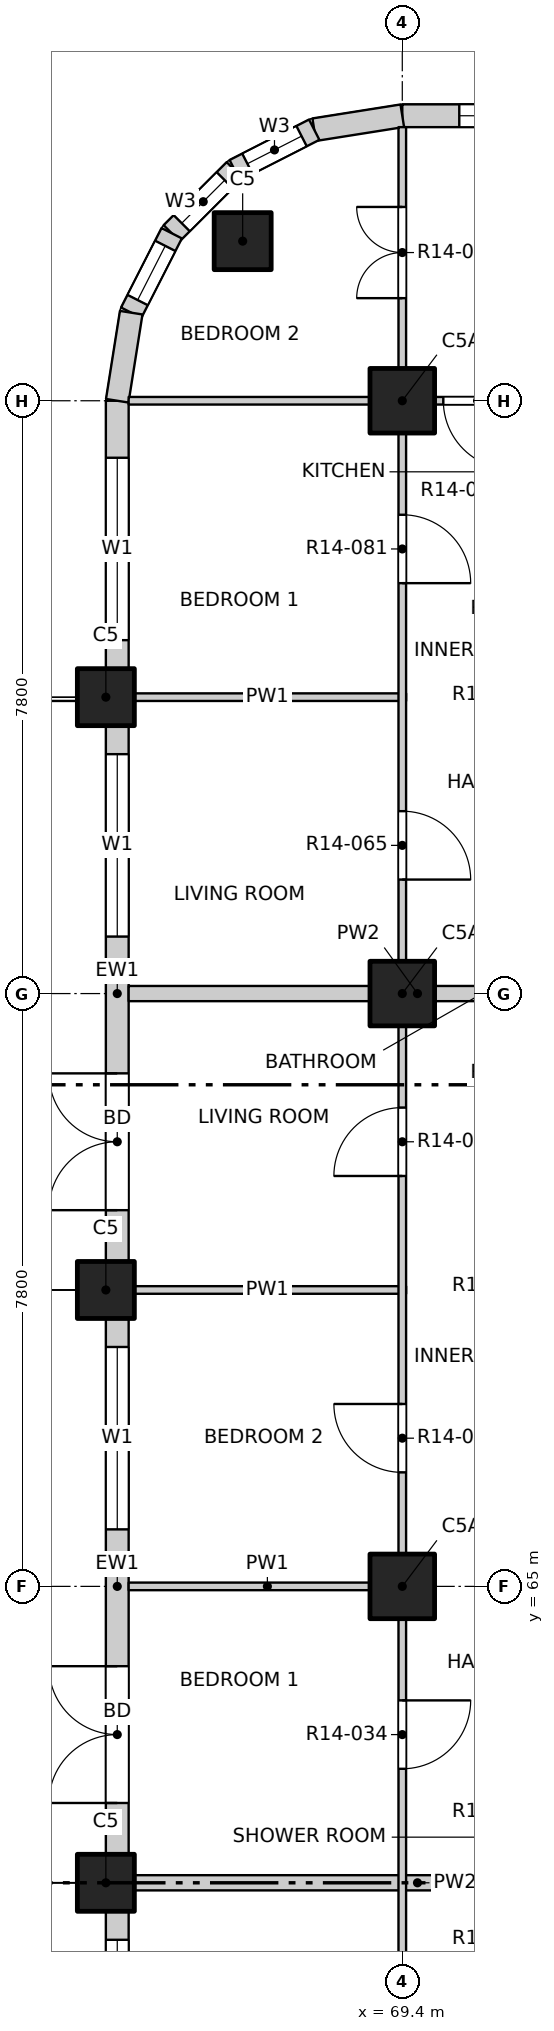
"""IFC4 building model, lengths in metres.
Left out: names, types, materials, properties, quantities, classifications, styles, units other than length and angle.
Written with IfcOpenShell. Run it as: python <this file> out.ifc"""

import sys

from ifc_helpers import new_model, si_unit, direction, frame, frame_2d, origin, origin_2d, place, context, subcontext, project, spatial, rectangle, extrude, element, fill, save


model = new_model("IFC4")
c1 = context("Model", 3, precision=1e-05, world=origin(), true_north=direction((0.0, 1.0)))
c2 = subcontext(c1, "Body", "Model", "MODEL_VIEW")
j1 = project(units=[si_unit("LENGTHUNIT", "METRE"), si_unit("PLANEANGLEUNIT", "RADIAN")], contexts=[c1])
p1 = place(None, origin())
s1 = spatial("IfcSite", under=j1, at=p1, CompositionType="ELEMENT")
p2 = place(p1, origin())
s2 = spatial("IfcBuilding", under=s1, at=p2, CompositionType="ELEMENT")
p3 = place(p2, frame((0.0, 0.0, 152.0)))
s3 = spatial("IfcBuildingStorey", under=s2, at=p3, CompositionType="ELEMENT", Elevation=152.0)
for number, where, z_axis, x_axis in (
    (1, (67.3, 82.7, -0.25), (0.0, 0.0, 1.0), (1.0, 0.0, 0.0)),
    (2, (65.5, 61.1, -0.25), (0.0, 0.0, 1.0), (1.0, 0.0, 0.0)),
    (3, (65.5, 68.9, -0.25), (0.0, 0.0, 1.0), (1.0, 0.0, 0.0)),
    (4, (65.5, 76.7, -0.25), (0.0, 0.0, 1.0), (1.0, 0.0, 0.0)),
):
    element("IfcColumn", number, at=place(p3, frame(where, z_axis=z_axis, x_axis=x_axis)), inside=s3, PredefinedType="COLUMN", context=c2, shape_type="SweptSolid", body=[
        extrude(rectangle(XDim=0.75, YDim=0.75, at=origin_2d()), origin(), (0.0, 0.0, 1.0), 3.4),
    ])
for number, where, z_axis, x_axis in (
    (5, (69.4, 65.0, -0.25), (0.0, 0.0, 1.0), (1.0, 0.0, 0.0)),
    (6, (69.4, 72.8, -0.25), (0.0, 0.0, 1.0), (1.0, 0.0, 0.0)),
    (7, (69.4, 80.6, -0.25), (0.0, 0.0, 1.0), (1.0, 0.0, 0.0)),
):
    element("IfcColumn", number, at=place(p3, frame(where, z_axis=z_axis, x_axis=x_axis)), inside=s3, PredefinedType="COLUMN", context=c2, shape_type="SweptSolid", body=[
        extrude(rectangle(XDim=0.85, YDim=0.85, at=origin_2d()), origin(), (0.0, 0.0, 1.0), 3.4),
    ])
p4 = place(p3, frame((69.4, 84.35, 0.0), z_axis=(0.0, 0.0, 1.0), x_axis=(1.0, 0.0, 0.0)))
e8 = element("IfcWall", 8, at=p4, inside=s3, PredefinedType="SOLIDWALL", context=c2, shape_type="SweptSolid", body=[
    extrude(rectangle(XDim=3.525, YDim=0.3, at=frame_2d((1.763, 0.0))), origin(), (0.0, 0.0, 1.0), 2.7),
])
p5 = place(p4, frame((0.75, 0.0, 0.9)))
e9 = element("IfcOpeningElement", 9, at=p5, cuts=e8, PredefinedType="OPENING", context=c2, shape_type="SweptSolid", body=[
    extrude(rectangle(XDim=2.4, YDim=1.8, at=frame_2d((1.2, 0.9))), frame((0.0, 0.16, 0.0), z_axis=(0.0, -1.0, 0.0), x_axis=(1.0, 0.0, 0.0)), (0.0, 0.0, 1.0), 0.32),
])
p6 = place(p3, frame((65.65, 53.675, 0.0), z_axis=(0.0, 0.0, 1.0), x_axis=(0.0, 1.0, 0.0)))
e10 = element("IfcWall", 10, at=p6, inside=s3, PredefinedType="SOLIDWALL", context=c2, shape_type="SweptSolid", body=[
    extrude(rectangle(XDim=7.05, YDim=0.3, at=frame_2d((3.525, 0.0))), origin(), (0.0, 0.0, 1.0), 2.7),
])
p7 = place(p6, frame((0.675, 0.0, 0.0)))
e11 = element("IfcOpeningElement", 11, at=p7, cuts=e10, PredefinedType="OPENING", context=c2, shape_type="SweptSolid", body=[
    extrude(rectangle(XDim=1.8, YDim=2.4, at=frame_2d((0.9, 1.2))), frame((0.0, 0.16, 0.0), z_axis=(0.0, -1.0, 0.0), x_axis=(1.0, 0.0, 0.0)), (0.0, 0.0, 1.0), 0.32),
])
p8 = place(p6, frame((4.275, 0.0, 0.9)))
e12 = element("IfcOpeningElement", 12, at=p8, cuts=e10, PredefinedType="OPENING", context=c2, shape_type="SweptSolid", body=[
    extrude(rectangle(XDim=2.4, YDim=1.8, at=frame_2d((1.2, 0.9))), frame((0.0, 0.16, 0.0), z_axis=(0.0, -1.0, 0.0), x_axis=(1.0, 0.0, 0.0)), (0.0, 0.0, 1.0), 0.32),
])
p9 = place(p3, frame((65.65, 61.475, 0.0), z_axis=(0.0, 0.0, 1.0), x_axis=(0.0, 1.0, 0.0)))
e13 = element("IfcWall", 13, at=p9, inside=s3, PredefinedType="SOLIDWALL", context=c2, shape_type="SweptSolid", body=[
    extrude(rectangle(XDim=7.05, YDim=0.3, at=frame_2d((3.525, 0.0))), origin(), (0.0, 0.0, 1.0), 2.7),
])
p10 = place(p9, frame((0.675, 0.0, 0.0)))
e14 = element("IfcOpeningElement", 14, at=p10, cuts=e13, PredefinedType="OPENING", context=c2, shape_type="SweptSolid", body=[
    extrude(rectangle(XDim=1.8, YDim=2.4, at=frame_2d((0.9, 1.2))), frame((0.0, 0.16, 0.0), z_axis=(0.0, -1.0, 0.0), x_axis=(1.0, 0.0, 0.0)), (0.0, 0.0, 1.0), 0.32),
])
p11 = place(p9, frame((4.275, 0.0, 0.9)))
e15 = element("IfcOpeningElement", 15, at=p11, cuts=e13, PredefinedType="OPENING", context=c2, shape_type="SweptSolid", body=[
    extrude(rectangle(XDim=2.4, YDim=1.8, at=frame_2d((1.2, 0.9))), frame((0.0, 0.16, 0.0), z_axis=(0.0, -1.0, 0.0), x_axis=(1.0, 0.0, 0.0)), (0.0, 0.0, 1.0), 0.32),
])
p12 = place(p3, frame((65.65, 69.275, 0.0), z_axis=(0.0, 0.0, 1.0), x_axis=(0.0, 1.0, 0.0)))
e16 = element("IfcWall", 16, at=p12, inside=s3, PredefinedType="SOLIDWALL", context=c2, shape_type="SweptSolid", body=[
    extrude(rectangle(XDim=7.05, YDim=0.3, at=frame_2d((3.525, 0.0))), origin(), (0.0, 0.0, 1.0), 2.7),
])
p13 = place(p12, frame((0.675, 0.0, 0.0)))
e17 = element("IfcOpeningElement", 17, at=p13, cuts=e16, PredefinedType="OPENING", context=c2, shape_type="SweptSolid", body=[
    extrude(rectangle(XDim=1.8, YDim=2.4, at=frame_2d((0.9, 1.2))), frame((0.0, 0.16, 0.0), z_axis=(0.0, -1.0, 0.0), x_axis=(1.0, 0.0, 0.0)), (0.0, 0.0, 1.0), 0.32),
])
p14 = place(p12, frame((4.275, 0.0, 0.9)))
e18 = element("IfcOpeningElement", 18, at=p14, cuts=e16, PredefinedType="OPENING", context=c2, shape_type="SweptSolid", body=[
    extrude(rectangle(XDim=2.4, YDim=1.8, at=frame_2d((1.2, 0.9))), frame((0.0, 0.16, 0.0), z_axis=(0.0, -1.0, 0.0), x_axis=(1.0, 0.0, 0.0)), (0.0, 0.0, 1.0), 0.32),
])
p15 = place(p3, frame((65.65, 77.075, 0.0), z_axis=(0.0, 0.0, 1.0), x_axis=(0.0, 1.0, 0.0)))
e19 = element("IfcWall", 19, at=p15, inside=s3, PredefinedType="SOLIDWALL", context=c2, shape_type="SweptSolid", body=[
    extrude(rectangle(XDim=3.525, YDim=0.3, at=frame_2d((1.763, 0.0))), origin(), (0.0, 0.0, 1.0), 2.7),
])
p16 = place(p15, frame((0.375, 0.0, 0.9)))
e20 = element("IfcOpeningElement", 20, at=p16, cuts=e19, PredefinedType="OPENING", context=c2, shape_type="SweptSolid", body=[
    extrude(rectangle(XDim=2.4, YDim=1.8, at=frame_2d((1.2, 0.9))), frame((0.0, 0.16, 0.0), z_axis=(0.0, -1.0, 0.0), x_axis=(1.0, 0.0, 0.0)), (0.0, 0.0, 1.0), 0.32),
])
p17 = place(p3, frame((69.4, 84.35, 0.0), z_axis=(0.0, 0.0, 1.0), x_axis=(-0.987678452879, -0.156496880861, 0.0)))
e21 = element("IfcWall", 21, at=p17, inside=s3, PredefinedType="SOLIDWALL", context=c2, shape_type="SweptSolid", body=[
    extrude(rectangle(XDim=1.173, YDim=0.3, at=frame_2d((0.586, 0.0))), origin(), (0.0, 0.0, 1.0), 2.7),
])
p18 = place(p3, frame((68.241, 84.167, 0.0), z_axis=(0.0, 0.0, 1.0), x_axis=(-0.890988677504, -0.454025524128, 0.0)))
e22 = element("IfcWall", 22, at=p18, inside=s3, PredefinedType="SOLIDWALL", context=c2, shape_type="SweptSolid", body=[
    extrude(rectangle(XDim=1.173, YDim=0.3, at=frame_2d((0.587, 0.0))), origin(), (0.0, 0.0, 1.0), 2.7),
])
p19 = place(p18, frame((0.187, 0.0, 0.9)))
e23 = element("IfcOpeningElement", 23, at=p19, cuts=e22, PredefinedType="OPENING", context=c2, shape_type="SweptSolid", body=[
    extrude(rectangle(XDim=0.8, YDim=1.2, at=frame_2d((0.4, 0.6))), frame((0.0, 0.16, 0.0), z_axis=(0.0, -1.0, 0.0), x_axis=(1.0, 0.0, 0.0)), (0.0, 0.0, 1.0), 0.32),
])
p20 = place(p3, frame((67.196, 83.634, 0.0), z_axis=(0.0, 0.0, 1.0), x_axis=(-0.707106781187, -0.707106781187, 0.0)))
e24 = element("IfcWall", 24, at=p20, inside=s3, PredefinedType="SOLIDWALL", context=c2, shape_type="SweptSolid", body=[
    extrude(rectangle(XDim=1.173, YDim=0.3, at=frame_2d((0.586, 0.0))), origin(), (0.0, 0.0, 1.0), 2.7),
])
p21 = place(p20, frame((0.187, 0.0, 0.9)))
e25 = element("IfcOpeningElement", 25, at=p21, cuts=e24, PredefinedType="OPENING", context=c2, shape_type="SweptSolid", body=[
    extrude(rectangle(XDim=0.8, YDim=1.2, at=frame_2d((0.4, 0.6))), frame((0.0, 0.16, 0.0), z_axis=(0.0, -1.0, 0.0), x_axis=(1.0, 0.0, 0.0)), (0.0, 0.0, 1.0), 0.32),
])
p22 = place(p3, frame((66.366, 82.804, 0.0), z_axis=(0.0, 0.0, 1.0), x_axis=(-0.454025524128, -0.890988677504, 0.0)))
e26 = element("IfcWall", 26, at=p22, inside=s3, PredefinedType="SOLIDWALL", context=c2, shape_type="SweptSolid", body=[
    extrude(rectangle(XDim=1.173, YDim=0.3, at=frame_2d((0.587, 0.0))), origin(), (0.0, 0.0, 1.0), 2.7),
])
p23 = place(p22, frame((0.187, 0.0, 0.9)))
e27 = element("IfcOpeningElement", 27, at=p23, cuts=e26, PredefinedType="OPENING", context=c2, shape_type="SweptSolid", body=[
    extrude(rectangle(XDim=0.8, YDim=1.2, at=frame_2d((0.4, 0.6))), frame((0.0, 0.16, 0.0), z_axis=(0.0, -1.0, 0.0), x_axis=(1.0, 0.0, 0.0)), (0.0, 0.0, 1.0), 0.32),
])
p24 = place(p3, frame((65.833, 81.759, 0.0), z_axis=(0.0, 0.0, 1.0), x_axis=(-0.156496880861, -0.987678452879, 0.0)))
e28 = element("IfcWall", 28, at=p24, inside=s3, PredefinedType="SOLIDWALL", context=c2, shape_type="SweptSolid", body=[
    extrude(rectangle(XDim=1.173, YDim=0.3, at=frame_2d((0.586, 0.0))), origin(), (0.0, 0.0, 1.0), 2.7),
])
p25 = place(p3, frame((65.8, 61.1, 0.0), z_axis=(0.0, 0.0, 1.0), x_axis=(1.0, 0.0, 0.0)))
e29 = element("IfcWall", 29, at=p25, inside=s3, PredefinedType="PARTITIONING", context=c2, shape_type="SweptSolid", body=[
    extrude(rectangle(XDim=7.6, YDim=0.2, at=frame_2d((3.8, 0.0))), origin(), (0.0, 0.0, 1.0), 2.55),
])
p26 = place(p3, frame((65.8, 65.0, 0.0), z_axis=(0.0, 0.0, 1.0), x_axis=(1.0, 0.0, 0.0)))
e30 = element("IfcWall", 30, at=p26, inside=s3, PredefinedType="PARTITIONING", context=c2, shape_type="SweptSolid", body=[
    extrude(rectangle(XDim=3.65, YDim=0.1, at=frame_2d((1.825, 0.0))), origin(), (0.0, 0.0, 1.0), 3.15),
])
p27 = place(p3, frame((65.8, 68.9, 0.0), z_axis=(0.0, 0.0, 1.0), x_axis=(1.0, 0.0, 0.0)))
e31 = element("IfcWall", 31, at=p27, inside=s3, PredefinedType="PARTITIONING", context=c2, shape_type="SweptSolid", body=[
    extrude(rectangle(XDim=3.65, YDim=0.1, at=frame_2d((1.825, 0.0))), origin(), (0.0, 0.0, 1.0), 2.55),
])
p28 = place(p3, frame((65.8, 72.8, 0.0), z_axis=(0.0, 0.0, 1.0), x_axis=(1.0, 0.0, 0.0)))
e32 = element("IfcWall", 32, at=p28, inside=s3, PredefinedType="PARTITIONING", context=c2, shape_type="SweptSolid", body=[
    extrude(rectangle(XDim=7.6, YDim=0.2, at=frame_2d((3.8, 0.0))), origin(), (0.0, 0.0, 1.0), 3.15),
])
p29 = place(p3, frame((65.8, 76.7, 0.0), z_axis=(0.0, 0.0, 1.0), x_axis=(1.0, 0.0, 0.0)))
e33 = element("IfcWall", 33, at=p29, inside=s3, PredefinedType="PARTITIONING", context=c2, shape_type="SweptSolid", body=[
    extrude(rectangle(XDim=3.65, YDim=0.1, at=frame_2d((1.825, 0.0))), origin(), (0.0, 0.0, 1.0), 2.55),
])
p30 = place(p3, frame((65.8, 80.6, 0.0), z_axis=(0.0, 0.0, 1.0), x_axis=(1.0, 0.0, 0.0)))
e34 = element("IfcWall", 34, at=p30, inside=s3, PredefinedType="PARTITIONING", context=c2, shape_type="SweptSolid", body=[
    extrude(rectangle(XDim=7.6, YDim=0.1, at=frame_2d((3.8, 0.0))), origin(), (0.0, 0.0, 1.0), 3.15),
])
p31 = place(p30, frame((4.14, 0.0, 0.0)))
e35 = element("IfcOpeningElement", 35, at=p31, cuts=e34, PredefinedType="OPENING", context=c2, shape_type="SweptSolid", body=[
    extrude(rectangle(XDim=0.9, YDim=2.1, at=frame_2d((0.45, 1.05))), frame((0.0, 0.06, 0.0), z_axis=(0.0, -1.0, 0.0), x_axis=(1.0, 0.0, 0.0)), (0.0, 0.0, 1.0), 0.12),
])
p32 = place(p3, frame((69.4, 45.8, 0.0), z_axis=(0.0, 0.0, 1.0), x_axis=(0.0, 1.0, 0.0)))
e36 = element("IfcWall", 36, at=p32, inside=s3, PredefinedType="PARTITIONING", context=c2, shape_type="SweptSolid", body=[
    extrude(rectangle(XDim=38.4, YDim=0.1, at=frame_2d((19.2, 0.0))), origin(), (0.0, 0.0, 1.0), 3.15),
])
p33 = place(p32, frame((1.05, 0.0, 0.0)))
e37 = element("IfcOpeningElement", 37, at=p33, cuts=e36, PredefinedType="OPENING", context=c2, shape_type="SweptSolid", body=[
    extrude(rectangle(XDim=1.2, YDim=2.1, at=frame_2d((0.6, 1.05))), frame((0.0, 0.06, 0.0), z_axis=(0.0, -1.0, 0.0), x_axis=(1.0, 0.0, 0.0)), (0.0, 0.0, 1.0), 0.12),
])
p34 = place(p32, frame((6.9, 0.0, 0.0)))
e38 = element("IfcOpeningElement", 38, at=p34, cuts=e36, PredefinedType="OPENING", context=c2, shape_type="SweptSolid", body=[
    extrude(rectangle(XDim=1.2, YDim=2.1, at=frame_2d((0.6, 1.05))), frame((0.0, 0.06, 0.0), z_axis=(0.0, -1.0, 0.0), x_axis=(1.0, 0.0, 0.0)), (0.0, 0.0, 1.0), 0.12),
])
p35 = place(p32, frame((12.9, 0.0, 0.0)))
e39 = element("IfcOpeningElement", 39, at=p35, cuts=e36, PredefinedType="OPENING", context=c2, shape_type="SweptSolid", body=[
    extrude(rectangle(XDim=0.9, YDim=2.1, at=frame_2d((0.45, 1.05))), frame((0.0, 0.06, 0.0), z_axis=(0.0, -1.0, 0.0), x_axis=(1.0, 0.0, 0.0)), (0.0, 0.0, 1.0), 0.12),
])
p36 = place(p32, frame((16.8, 0.0, 0.0)))
e40 = element("IfcOpeningElement", 40, at=p36, cuts=e36, PredefinedType="OPENING", context=c2, shape_type="SweptSolid", body=[
    extrude(rectangle(XDim=0.9, YDim=2.1, at=frame_2d((0.45, 1.05))), frame((0.0, 0.06, 0.0), z_axis=(0.0, -1.0, 0.0), x_axis=(1.0, 0.0, 0.0)), (0.0, 0.0, 1.0), 0.12),
])
p37 = place(p32, frame((20.7, 0.0, 0.0)))
e41 = element("IfcOpeningElement", 41, at=p37, cuts=e36, PredefinedType="OPENING", context=c2, shape_type="SweptSolid", body=[
    extrude(rectangle(XDim=0.9, YDim=2.1, at=frame_2d((0.45, 1.05))), frame((0.0, 0.06, 0.0), z_axis=(0.0, -1.0, 0.0), x_axis=(1.0, 0.0, 0.0)), (0.0, 0.0, 1.0), 0.12),
])
p38 = place(p32, frame((24.6, 0.0, 0.0)))
e42 = element("IfcOpeningElement", 42, at=p38, cuts=e36, PredefinedType="OPENING", context=c2, shape_type="SweptSolid", body=[
    extrude(rectangle(XDim=0.9, YDim=2.1, at=frame_2d((0.45, 1.05))), frame((0.0, 0.06, 0.0), z_axis=(0.0, -1.0, 0.0), x_axis=(1.0, 0.0, 0.0)), (0.0, 0.0, 1.0), 0.12),
])
p39 = place(p32, frame((28.5, 0.0, 0.0)))
e43 = element("IfcOpeningElement", 43, at=p39, cuts=e36, PredefinedType="OPENING", context=c2, shape_type="SweptSolid", body=[
    extrude(rectangle(XDim=0.9, YDim=2.1, at=frame_2d((0.45, 1.05))), frame((0.0, 0.06, 0.0), z_axis=(0.0, -1.0, 0.0), x_axis=(1.0, 0.0, 0.0)), (0.0, 0.0, 1.0), 0.12),
])
p40 = place(p32, frame((32.4, 0.0, 0.0)))
e44 = element("IfcOpeningElement", 44, at=p40, cuts=e36, PredefinedType="OPENING", context=c2, shape_type="SweptSolid", body=[
    extrude(rectangle(XDim=0.9, YDim=2.1, at=frame_2d((0.45, 1.05))), frame((0.0, 0.06, 0.0), z_axis=(0.0, -1.0, 0.0), x_axis=(1.0, 0.0, 0.0)), (0.0, 0.0, 1.0), 0.12),
])
p41 = place(p32, frame((36.15, 0.0, 0.0)))
e45 = element("IfcOpeningElement", 45, at=p41, cuts=e36, PredefinedType="OPENING", context=c2, shape_type="SweptSolid", body=[
    extrude(rectangle(XDim=1.2, YDim=2.1, at=frame_2d((0.6, 1.05))), frame((0.0, 0.06, 0.0), z_axis=(0.0, -1.0, 0.0), x_axis=(1.0, 0.0, 0.0)), (0.0, 0.0, 1.0), 0.12),
])
p42 = place(p5, origin())
e46 = element("IfcWindow", 46, at=p42, inside=s3, PartitioningType="DOUBLE_PANEL_VERTICAL", PredefinedType="WINDOW", context=c2, shape_type="SweptSolid", body=[
    extrude(rectangle(XDim=2.4, YDim=1.8, at=frame_2d((1.2, 0.9))), frame((0.0, 0.03, 0.0), z_axis=(0.0, -1.0, 0.0), x_axis=(1.0, 0.0, 0.0)), (0.0, 0.0, 1.0), 0.06),
])
fill(e9, e46)
p43 = place(p8, origin())
e47 = element("IfcWindow", 47, at=p43, inside=s3, PartitioningType="DOUBLE_PANEL_VERTICAL", PredefinedType="WINDOW", context=c2, shape_type="SweptSolid", body=[
    extrude(rectangle(XDim=2.4, YDim=1.8, at=frame_2d((1.2, 0.9))), frame((0.0, 0.03, 0.0), z_axis=(0.0, -1.0, 0.0), x_axis=(1.0, 0.0, 0.0)), (0.0, 0.0, 1.0), 0.06),
])
fill(e12, e47)
p44 = place(p10, origin())
e48 = element("IfcDoor", 48, at=p44, inside=s3, OperationType="DOUBLE_DOOR_SINGLE_SWING", PredefinedType="DOOR", context=c2, shape_type="SweptSolid", body=[
    extrude(rectangle(XDim=1.8, YDim=2.4, at=frame_2d((0.9, 1.2))), frame((0.0, 0.025, 0.0), z_axis=(0.0, -1.0, 0.0), x_axis=(1.0, 0.0, 0.0)), (0.0, 0.0, 1.0), 0.05),
])
fill(e14, e48)
p45 = place(p11, origin())
e49 = element("IfcWindow", 49, at=p45, inside=s3, PartitioningType="DOUBLE_PANEL_VERTICAL", PredefinedType="WINDOW", context=c2, shape_type="SweptSolid", body=[
    extrude(rectangle(XDim=2.4, YDim=1.8, at=frame_2d((1.2, 0.9))), frame((0.0, 0.03, 0.0), z_axis=(0.0, -1.0, 0.0), x_axis=(1.0, 0.0, 0.0)), (0.0, 0.0, 1.0), 0.06),
])
fill(e15, e49)
p46 = place(p13, origin())
e50 = element("IfcDoor", 50, at=p46, inside=s3, OperationType="DOUBLE_DOOR_SINGLE_SWING", PredefinedType="DOOR", context=c2, shape_type="SweptSolid", body=[
    extrude(rectangle(XDim=1.8, YDim=2.4, at=frame_2d((0.9, 1.2))), frame((0.0, 0.025, 0.0), z_axis=(0.0, -1.0, 0.0), x_axis=(1.0, 0.0, 0.0)), (0.0, 0.0, 1.0), 0.05),
])
fill(e17, e50)
p47 = place(p14, origin())
e51 = element("IfcWindow", 51, at=p47, inside=s3, PartitioningType="DOUBLE_PANEL_VERTICAL", PredefinedType="WINDOW", context=c2, shape_type="SweptSolid", body=[
    extrude(rectangle(XDim=2.4, YDim=1.8, at=frame_2d((1.2, 0.9))), frame((0.0, 0.03, 0.0), z_axis=(0.0, -1.0, 0.0), x_axis=(1.0, 0.0, 0.0)), (0.0, 0.0, 1.0), 0.06),
])
fill(e18, e51)
p48 = place(p16, origin())
e52 = element("IfcWindow", 52, at=p48, inside=s3, PartitioningType="DOUBLE_PANEL_VERTICAL", PredefinedType="WINDOW", context=c2, shape_type="SweptSolid", body=[
    extrude(rectangle(XDim=2.4, YDim=1.8, at=frame_2d((1.2, 0.9))), frame((0.0, 0.03, 0.0), z_axis=(0.0, -1.0, 0.0), x_axis=(1.0, 0.0, 0.0)), (0.0, 0.0, 1.0), 0.06),
])
fill(e20, e52)
p49 = place(p19, origin())
e53 = element("IfcWindow", 53, at=p49, inside=s3, PartitioningType="SINGLE_PANEL", PredefinedType="WINDOW", context=c2, shape_type="SweptSolid", body=[
    extrude(rectangle(XDim=0.8, YDim=1.2, at=frame_2d((0.4, 0.6))), frame((0.0, 0.03, 0.0), z_axis=(0.0, -1.0, 0.0), x_axis=(1.0, 0.0, 0.0)), (0.0, 0.0, 1.0), 0.06),
])
fill(e23, e53)
p50 = place(p21, origin())
e54 = element("IfcWindow", 54, at=p50, inside=s3, PartitioningType="SINGLE_PANEL", PredefinedType="WINDOW", context=c2, shape_type="SweptSolid", body=[
    extrude(rectangle(XDim=0.8, YDim=1.2, at=frame_2d((0.4, 0.6))), frame((0.0, 0.03, 0.0), z_axis=(0.0, -1.0, 0.0), x_axis=(1.0, 0.0, 0.0)), (0.0, 0.0, 1.0), 0.06),
])
fill(e25, e54)
p51 = place(p23, origin())
e55 = element("IfcWindow", 55, at=p51, inside=s3, PartitioningType="SINGLE_PANEL", PredefinedType="WINDOW", context=c2, shape_type="SweptSolid", body=[
    extrude(rectangle(XDim=0.8, YDim=1.2, at=frame_2d((0.4, 0.6))), frame((0.0, 0.03, 0.0), z_axis=(0.0, -1.0, 0.0), x_axis=(1.0, 0.0, 0.0)), (0.0, 0.0, 1.0), 0.06),
])
fill(e27, e55)
p52 = place(p36, origin())
e56 = element("IfcDoor", 56, at=p52, inside=s3, OperationType="SINGLE_SWING_LEFT", PredefinedType="DOOR", context=c2, shape_type="SweptSolid", body=[
    extrude(rectangle(XDim=0.9, YDim=2.1, at=frame_2d((0.45, 1.05))), frame((0.0, 0.025, 0.0), z_axis=(0.0, -1.0, 0.0), x_axis=(1.0, 0.0, 0.0)), (0.0, 0.0, 1.0), 0.05),
])
fill(e40, e56)
p53 = place(p37, origin())
e57 = element("IfcDoor", 57, at=p53, inside=s3, OperationType="SINGLE_SWING_RIGHT", PredefinedType="DOOR", context=c2, shape_type="SweptSolid", body=[
    extrude(rectangle(XDim=0.9, YDim=2.1, at=frame_2d((0.45, 1.05))), frame((0.0, 0.025, 0.0), z_axis=(0.0, -1.0, 0.0), x_axis=(1.0, 0.0, 0.0)), (0.0, 0.0, 1.0), 0.05),
])
fill(e41, e57)
p54 = place(p38, origin())
e58 = element("IfcDoor", 58, at=p54, inside=s3, OperationType="SINGLE_SWING_LEFT", PredefinedType="DOOR", context=c2, shape_type="SweptSolid", body=[
    extrude(rectangle(XDim=0.9, YDim=2.1, at=frame_2d((0.45, 1.05))), frame((0.0, 0.025, 0.0), z_axis=(0.0, -1.0, 0.0), x_axis=(1.0, 0.0, 0.0)), (0.0, 0.0, 1.0), 0.05),
])
fill(e42, e58)
p55 = place(p39, origin())
e59 = element("IfcDoor", 59, at=p55, inside=s3, OperationType="SINGLE_SWING_RIGHT", PredefinedType="DOOR", context=c2, shape_type="SweptSolid", body=[
    extrude(rectangle(XDim=0.9, YDim=2.1, at=frame_2d((0.45, 1.05))), frame((0.0, 0.025, 0.0), z_axis=(0.0, -1.0, 0.0), x_axis=(1.0, 0.0, 0.0)), (0.0, 0.0, 1.0), 0.05),
])
fill(e43, e59)
p56 = place(p40, origin())
e60 = element("IfcDoor", 60, at=p56, inside=s3, OperationType="SINGLE_SWING_RIGHT", PredefinedType="DOOR", context=c2, shape_type="SweptSolid", body=[
    extrude(rectangle(XDim=0.9, YDim=2.1, at=frame_2d((0.45, 1.05))), frame((0.0, 0.025, 0.0), z_axis=(0.0, -1.0, 0.0), x_axis=(1.0, 0.0, 0.0)), (0.0, 0.0, 1.0), 0.05),
])
fill(e44, e60)
p57 = place(p31, origin())
e61 = element("IfcDoor", 61, at=p57, inside=s3, OperationType="SINGLE_SWING_LEFT", PredefinedType="DOOR", context=c2, shape_type="SweptSolid", body=[
    extrude(rectangle(XDim=0.9, YDim=2.1, at=frame_2d((0.45, 1.05))), frame((0.0, 0.025, 0.0), z_axis=(0.0, -1.0, 0.0), x_axis=(1.0, 0.0, 0.0)), (0.0, 0.0, 1.0), 0.05),
])
fill(e35, e61)
p58 = place(p41, origin())
e62 = element("IfcDoor", 62, at=p58, inside=s3, OperationType="DOUBLE_DOOR_SINGLE_SWING", PredefinedType="DOOR", context=c2, shape_type="SweptSolid", body=[
    extrude(rectangle(XDim=1.2, YDim=2.1, at=frame_2d((0.6, 1.05))), frame((0.0, 0.025, 0.0), z_axis=(0.0, -1.0, 0.0), x_axis=(1.0, 0.0, 0.0)), (0.0, 0.0, 1.0), 0.05),
])
fill(e45, e62)
save(model, sys.argv[1])
